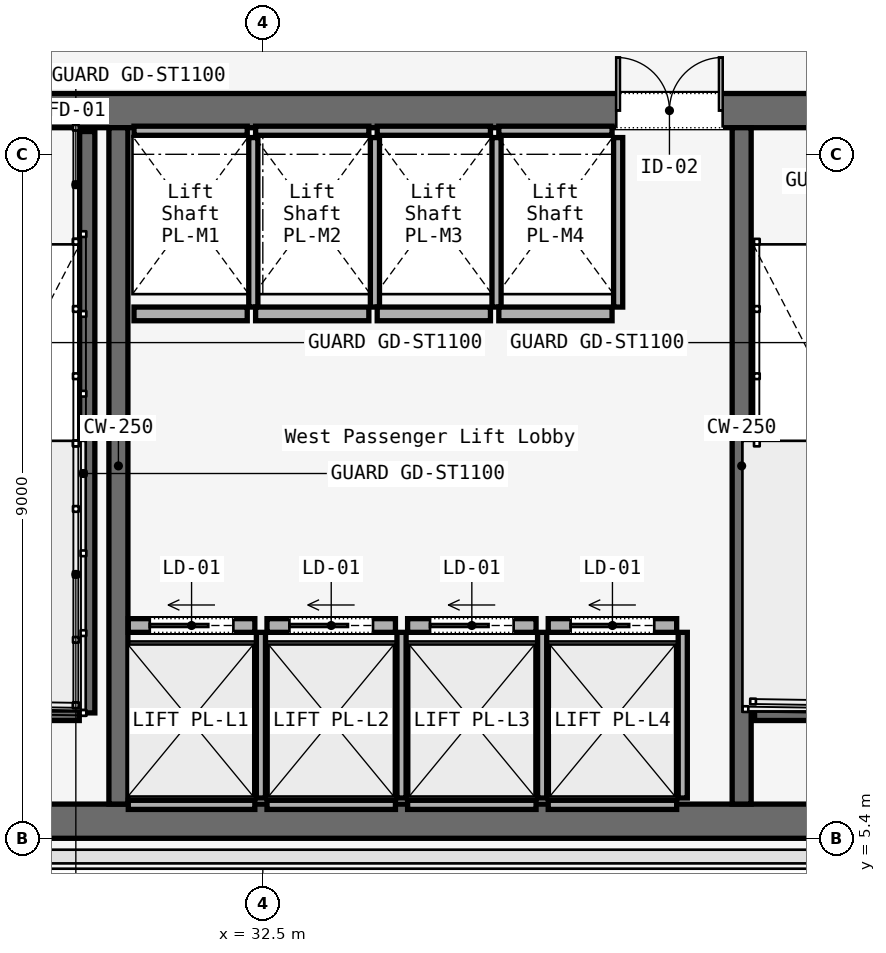
"""IFC4 building model, lengths in metres.
Left out: names, types, materials, properties, quantities, classifications, styles, units other than length and angle.
Written with IfcOpenShell. Run it as: python <this file> out.ifc"""

import sys

from ifc_helpers import new_model, si_unit, direction, frame, frame_2d, origin, place, context, subcontext, project, spatial, rectangle, extrude, element, fill, save


model = new_model("IFC4")
c1 = context("Model", 3, precision=1e-05, world=origin(), true_north=direction((0.0, 1.0)))
c2 = subcontext(c1, "Body", "Model", "MODEL_VIEW")
j1 = project(units=[si_unit("LENGTHUNIT", "METRE"), si_unit("PLANEANGLEUNIT", "RADIAN")], contexts=[c1])
p1 = place(None, origin())
s1 = spatial("IfcSite", under=j1, at=p1, CompositionType="ELEMENT")
p2 = place(p1, origin())
s2 = spatial("IfcBuilding", under=s1, at=p2, CompositionType="ELEMENT")
p3 = place(p2, frame((0.0, 0.0, 43.6)))
s3 = spatial("IfcBuildingStorey", under=s2, at=p3, CompositionType="ELEMENT", Elevation=43.6)
p4 = place(p3, frame((26.45, 14.975, 0.0), z_axis=(0.0, 0.0, 1.0), x_axis=(1.0, 0.0, 0.0)))
e1 = element("IfcWall", 1, at=p4, inside=s3, PredefinedType="SOLIDWALL", context=c2, shape_type="SweptSolid", body=[
    extrude(rectangle(XDim=31.1, YDim=0.45, at=frame_2d((15.55, 0.0))), origin(), (0.0, 0.0, 1.0), 3.58),
])
p5 = place(p4, frame((1.65, 0.0, 0.0)))
e2 = element("IfcOpeningElement", 2, at=p5, cuts=e1, PredefinedType="OPENING", context=c2, shape_type="SweptSolid", body=[
    extrude(rectangle(XDim=1.1, YDim=2.2, at=frame_2d((0.55, 1.1))), frame((0.0, 0.225, 0.0), z_axis=(0.0, -1.0, 0.0), x_axis=(1.0, 0.0, 0.0)), (0.0, 0.0, 1.0), 0.45),
])
p6 = place(p4, frame((13.65, 0.0, 0.0)))
e3 = element("IfcOpeningElement", 3, at=p6, cuts=e1, PredefinedType="OPENING", context=c2, shape_type="SweptSolid", body=[
    extrude(rectangle(XDim=1.1, YDim=2.2, at=frame_2d((0.55, 1.1))), frame((0.0, 0.225, 0.0), z_axis=(0.0, -1.0, 0.0), x_axis=(1.0, 0.0, 0.0)), (0.0, 0.0, 1.0), 0.45),
])
p7 = place(p4, frame((25.55, 0.0, 0.0)))
e4 = element("IfcOpeningElement", 4, at=p7, cuts=e1, PredefinedType="OPENING", context=c2, shape_type="SweptSolid", body=[
    extrude(rectangle(XDim=1.1, YDim=2.2, at=frame_2d((0.55, 1.1))), frame((0.0, 0.225, 0.0), z_axis=(0.0, -1.0, 0.0), x_axis=(1.0, 0.0, 0.0)), (0.0, 0.0, 1.0), 0.45),
])
p8 = place(p4, frame((10.7, 0.0, 0.0)))
e5 = element("IfcOpeningElement", 5, at=p8, cuts=e1, PredefinedType="OPENING", context=c2, shape_type="SweptSolid", body=[
    extrude(rectangle(XDim=1.4, YDim=2.2, at=frame_2d((0.7, 1.1))), frame((0.0, 0.225, 0.0), z_axis=(0.0, -1.0, 0.0), x_axis=(1.0, 0.0, 0.0)), (0.0, 0.0, 1.0), 0.45),
])
p9 = place(p4, frame((19.35, 0.0, 0.0)))
e6 = element("IfcOpeningElement", 6, at=p9, cuts=e1, PredefinedType="OPENING", context=c2, shape_type="SweptSolid", body=[
    extrude(rectangle(XDim=1.1, YDim=2.2, at=frame_2d((0.55, 1.1))), frame((0.0, 0.225, 0.0), z_axis=(0.0, -1.0, 0.0), x_axis=(1.0, 0.0, 0.0)), (0.0, 0.0, 1.0), 0.45),
])
p10 = place(p4, frame((21.4, 0.0, 0.0)))
e7 = element("IfcOpeningElement", 7, at=p10, cuts=e1, PredefinedType="OPENING", context=c2, shape_type="SweptSolid", body=[
    extrude(rectangle(XDim=0.9, YDim=2.1, at=frame_2d((0.45, 1.05))), frame((0.0, 0.225, 0.0), z_axis=(0.0, -1.0, 0.0), x_axis=(1.0, 0.0, 0.0)), (0.0, 0.0, 1.0), 0.45),
])
p11 = place(p4, frame((23.35, 0.0, 0.0)))
e8 = element("IfcOpeningElement", 8, at=p11, cuts=e1, PredefinedType="OPENING", context=c2, shape_type="SweptSolid", body=[
    extrude(rectangle(XDim=1.3, YDim=2.3, at=frame_2d((0.65, 1.15))), frame((0.0, 0.225, 0.0), z_axis=(0.0, -1.0, 0.0), x_axis=(1.0, 0.0, 0.0)), (0.0, 0.0, 1.0), 0.45),
])
p12 = place(p3, frame((26.45, 5.625, 0.0), z_axis=(0.0, 0.0, 1.0), x_axis=(1.0, 0.0, 0.0)))
e9 = element("IfcWall", 9, at=p12, inside=s3, PredefinedType="SOLIDWALL", context=c2, shape_type="SweptSolid", body=[
    extrude(rectangle(XDim=31.1, YDim=0.45, at=frame_2d((15.55, 0.0))), origin(), (0.0, 0.0, 1.0), 3.58),
])
for number, where, z_axis, x_axis in (
    (10, (30.6, 5.85, 0.0), (0.0, 0.0, 1.0), (0.0, 1.0, 0.0)),
    (11, (38.8, 5.85, 0.0), (0.0, 0.0, 1.0), (0.0, 1.0, 0.0)),
):
    element("IfcWall", number, at=place(p3, frame(where, z_axis=z_axis, x_axis=x_axis)), inside=s3, PredefinedType="SOLIDWALL", context=c2, shape_type="SweptSolid", body=[
        extrude(rectangle(XDim=8.9, YDim=0.25, at=frame_2d((4.45, 0.0))), origin(), (0.0, 0.0, 1.0), 3.58),
    ])
p13 = place(p3, frame((30.19, 14.7, 0.0), z_axis=(0.0, 0.0, 1.0), x_axis=(0.0, -1.0, 0.0)))
e12 = element("IfcWall", 12, at=p13, inside=s3, PredefinedType="SOLIDWALL", context=c2, shape_type="SweptSolid", body=[
    extrude(rectangle(XDim=7.65, YDim=0.2, at=frame_2d((3.825, 0.0))), origin(), (0.0, 0.0, 1.0), 3.8),
])
for number, where, z_axis, x_axis in (
    (13, (26.97, 7.05, 0.0), (0.0, 0.0, 1.0), (1.0, 0.0, 0.0)),
    (14, (38.97, 7.05, 0.0), (0.0, 0.0, 1.0), (1.0, 0.0, 0.0)),
):
    element("IfcWall", number, at=place(p3, frame(where, z_axis=z_axis, x_axis=x_axis)), inside=s3, PredefinedType="SOLIDWALL", context=c2, shape_type="SweptSolid", body=[
        extrude(rectangle(XDim=3.115, YDim=0.2, at=frame_2d((1.558, 0.0))), origin(), (0.0, 0.0, 1.0), 3.8),
    ])
p14 = place(p3, frame((30.73, 8.2, 0.0), z_axis=(0.0, 0.0, 1.0), x_axis=(1.0, 0.0, 0.0)))
e15 = element("IfcWall", 15, at=p14, inside=s3, PredefinedType="SOLIDWALL", context=c2, shape_type="SweptSolid", body=[
    extrude(rectangle(XDim=1.665, YDim=0.18, at=frame_2d((0.833, 0.0))), origin(), (0.0, 0.0, 1.0), 2.933),
])
p15 = place(p14, frame((0.282, 0.0, 0.0)))
e16 = element("IfcOpeningElement", 16, at=p15, cuts=e15, PredefinedType="OPENING", context=c2, shape_type="SweptSolid", body=[
    extrude(rectangle(XDim=1.1, YDim=2.2, at=frame_2d((0.55, 1.1))), frame((0.0, 0.09, 0.0), z_axis=(0.0, -1.0, 0.0), x_axis=(1.0, 0.0, 0.0)), (0.0, 0.0, 1.0), 0.18),
])
p16 = place(p3, frame((30.73, 5.84, 0.0), z_axis=(0.0, 0.0, 1.0), x_axis=(1.0, 0.0, 0.0)))
e17 = element("IfcWall", 17, at=p16, inside=s3, PredefinedType="SOLIDWALL", context=c2, shape_type="SweptSolid", body=[
    extrude(rectangle(XDim=1.665, YDim=0.12, at=frame_2d((0.833, 0.0))), origin(), (0.0, 0.0, 1.0), 2.933),
])
p17 = place(p3, frame((32.475, 5.93, 0.0), z_axis=(0.0, 0.0, 1.0), x_axis=(0.0, 1.0, 0.0)))
e18 = element("IfcWall", 18, at=p17, inside=s3, PredefinedType="SOLIDWALL", context=c2, shape_type="SweptSolid", body=[
    extrude(rectangle(XDim=2.18, YDim=0.12, at=frame_2d((1.09, 0.0))), origin(), (0.0, 0.0, 1.0), 2.933),
])
p18 = place(p3, frame((32.555, 8.2, 0.0), z_axis=(0.0, 0.0, 1.0), x_axis=(1.0, 0.0, 0.0)))
e19 = element("IfcWall", 19, at=p18, inside=s3, PredefinedType="SOLIDWALL", context=c2, shape_type="SweptSolid", body=[
    extrude(rectangle(XDim=1.69, YDim=0.18, at=frame_2d((0.845, 0.0))), origin(), (0.0, 0.0, 1.0), 2.933),
])
p19 = place(p18, frame((0.295, 0.0, 0.0)))
e20 = element("IfcOpeningElement", 20, at=p19, cuts=e19, PredefinedType="OPENING", context=c2, shape_type="SweptSolid", body=[
    extrude(rectangle(XDim=1.1, YDim=2.2, at=frame_2d((0.55, 1.1))), frame((0.0, 0.09, 0.0), z_axis=(0.0, -1.0, 0.0), x_axis=(1.0, 0.0, 0.0)), (0.0, 0.0, 1.0), 0.18),
])
p20 = place(p3, frame((32.555, 5.84, 0.0), z_axis=(0.0, 0.0, 1.0), x_axis=(1.0, 0.0, 0.0)))
e21 = element("IfcWall", 21, at=p20, inside=s3, PredefinedType="SOLIDWALL", context=c2, shape_type="SweptSolid", body=[
    extrude(rectangle(XDim=1.69, YDim=0.12, at=frame_2d((0.845, 0.0))), origin(), (0.0, 0.0, 1.0), 2.933),
])
p21 = place(p3, frame((34.325, 5.93, 0.0), z_axis=(0.0, 0.0, 1.0), x_axis=(0.0, 1.0, 0.0)))
e22 = element("IfcWall", 22, at=p21, inside=s3, PredefinedType="SOLIDWALL", context=c2, shape_type="SweptSolid", body=[
    extrude(rectangle(XDim=2.18, YDim=0.12, at=frame_2d((1.09, 0.0))), origin(), (0.0, 0.0, 1.0), 2.933),
])
p22 = place(p3, frame((34.405, 8.2, 0.0), z_axis=(0.0, 0.0, 1.0), x_axis=(1.0, 0.0, 0.0)))
e23 = element("IfcWall", 23, at=p22, inside=s3, PredefinedType="SOLIDWALL", context=c2, shape_type="SweptSolid", body=[
    extrude(rectangle(XDim=1.69, YDim=0.18, at=frame_2d((0.845, 0.0))), origin(), (0.0, 0.0, 1.0), 2.933),
])
p23 = place(p22, frame((0.295, 0.0, 0.0)))
e24 = element("IfcOpeningElement", 24, at=p23, cuts=e23, PredefinedType="OPENING", context=c2, shape_type="SweptSolid", body=[
    extrude(rectangle(XDim=1.1, YDim=2.2, at=frame_2d((0.55, 1.1))), frame((0.0, 0.09, 0.0), z_axis=(0.0, -1.0, 0.0), x_axis=(1.0, 0.0, 0.0)), (0.0, 0.0, 1.0), 0.18),
])
p24 = place(p3, frame((34.405, 5.84, 0.0), z_axis=(0.0, 0.0, 1.0), x_axis=(1.0, 0.0, 0.0)))
e25 = element("IfcWall", 25, at=p24, inside=s3, PredefinedType="SOLIDWALL", context=c2, shape_type="SweptSolid", body=[
    extrude(rectangle(XDim=1.69, YDim=0.12, at=frame_2d((0.845, 0.0))), origin(), (0.0, 0.0, 1.0), 2.933),
])
p25 = place(p3, frame((36.175, 5.93, 0.0), z_axis=(0.0, 0.0, 1.0), x_axis=(0.0, 1.0, 0.0)))
e26 = element("IfcWall", 26, at=p25, inside=s3, PredefinedType="SOLIDWALL", context=c2, shape_type="SweptSolid", body=[
    extrude(rectangle(XDim=2.18, YDim=0.12, at=frame_2d((1.09, 0.0))), origin(), (0.0, 0.0, 1.0), 2.933),
])
p26 = place(p3, frame((36.255, 8.2, 0.0), z_axis=(0.0, 0.0, 1.0), x_axis=(1.0, 0.0, 0.0)))
e27 = element("IfcWall", 27, at=p26, inside=s3, PredefinedType="SOLIDWALL", context=c2, shape_type="SweptSolid", body=[
    extrude(rectangle(XDim=1.69, YDim=0.18, at=frame_2d((0.845, 0.0))), origin(), (0.0, 0.0, 1.0), 2.933),
])
p27 = place(p26, frame((0.295, 0.0, 0.0)))
e28 = element("IfcOpeningElement", 28, at=p27, cuts=e27, PredefinedType="OPENING", context=c2, shape_type="SweptSolid", body=[
    extrude(rectangle(XDim=1.1, YDim=2.2, at=frame_2d((0.55, 1.1))), frame((0.0, 0.09, 0.0), z_axis=(0.0, -1.0, 0.0), x_axis=(1.0, 0.0, 0.0)), (0.0, 0.0, 1.0), 0.18),
])
p28 = place(p3, frame((36.255, 5.84, 0.0), z_axis=(0.0, 0.0, 1.0), x_axis=(1.0, 0.0, 0.0)))
e29 = element("IfcWall", 29, at=p28, inside=s3, PredefinedType="SOLIDWALL", context=c2, shape_type="SweptSolid", body=[
    extrude(rectangle(XDim=1.69, YDim=0.12, at=frame_2d((0.845, 0.0))), origin(), (0.0, 0.0, 1.0), 2.933),
])
p29 = place(p3, frame((38.025, 5.93, 0.0), z_axis=(0.0, 0.0, 1.0), x_axis=(0.0, 1.0, 0.0)))
e30 = element("IfcWall", 30, at=p29, inside=s3, PredefinedType="SOLIDWALL", context=c2, shape_type="SweptSolid", body=[
    extrude(rectangle(XDim=2.18, YDim=0.12, at=frame_2d((1.09, 0.0))), origin(), (0.0, 0.0, 1.0), 2.933),
])
p30 = place(p3, frame((30.805, 12.3, 0.0), z_axis=(0.0, 0.0, 1.0), x_axis=(1.0, 0.0, 0.0)))
e31 = element("IfcWall", 31, at=p30, inside=s3, PredefinedType="SOLIDWALL", context=c2, shape_type="SweptSolid", body=[
    extrude(rectangle(XDim=1.49, YDim=0.18, at=frame_2d((0.745, 0.0))), origin(), (0.0, 0.0, 1.0), 2.933),
])
p31 = place(p3, frame((30.805, 14.71, 0.0), z_axis=(0.0, 0.0, 1.0), x_axis=(1.0, 0.0, 0.0)))
e32 = element("IfcWall", 32, at=p31, inside=s3, PredefinedType="SOLIDWALL", context=c2, shape_type="SweptSolid", body=[
    extrude(rectangle(XDim=1.49, YDim=0.12, at=frame_2d((0.745, 0.0))), origin(), (0.0, 0.0, 1.0), 2.933),
])
p32 = place(p3, frame((32.375, 12.39, 0.0), z_axis=(0.0, 0.0, 1.0), x_axis=(0.0, 1.0, 0.0)))
e33 = element("IfcWall", 33, at=p32, inside=s3, PredefinedType="SOLIDWALL", context=c2, shape_type="SweptSolid", body=[
    extrude(rectangle(XDim=2.23, YDim=0.12, at=frame_2d((1.115, 0.0))), origin(), (0.0, 0.0, 1.0), 2.933),
])
p33 = place(p3, frame((32.405, 12.3, 0.0), z_axis=(0.0, 0.0, 1.0), x_axis=(1.0, 0.0, 0.0)))
e34 = element("IfcWall", 34, at=p33, inside=s3, PredefinedType="SOLIDWALL", context=c2, shape_type="SweptSolid", body=[
    extrude(rectangle(XDim=1.49, YDim=0.18, at=frame_2d((0.745, 0.0))), origin(), (0.0, 0.0, 1.0), 2.933),
])
p34 = place(p3, frame((32.405, 14.71, 0.0), z_axis=(0.0, 0.0, 1.0), x_axis=(1.0, 0.0, 0.0)))
e35 = element("IfcWall", 35, at=p34, inside=s3, PredefinedType="SOLIDWALL", context=c2, shape_type="SweptSolid", body=[
    extrude(rectangle(XDim=1.49, YDim=0.12, at=frame_2d((0.745, 0.0))), origin(), (0.0, 0.0, 1.0), 2.933),
])
p35 = place(p3, frame((33.975, 12.39, 0.0), z_axis=(0.0, 0.0, 1.0), x_axis=(0.0, 1.0, 0.0)))
e36 = element("IfcWall", 36, at=p35, inside=s3, PredefinedType="SOLIDWALL", context=c2, shape_type="SweptSolid", body=[
    extrude(rectangle(XDim=2.23, YDim=0.12, at=frame_2d((1.115, 0.0))), origin(), (0.0, 0.0, 1.0), 2.933),
])
p36 = place(p3, frame((34.005, 12.3, 0.0), z_axis=(0.0, 0.0, 1.0), x_axis=(1.0, 0.0, 0.0)))
e37 = element("IfcWall", 37, at=p36, inside=s3, PredefinedType="SOLIDWALL", context=c2, shape_type="SweptSolid", body=[
    extrude(rectangle(XDim=1.49, YDim=0.18, at=frame_2d((0.745, 0.0))), origin(), (0.0, 0.0, 1.0), 2.933),
])
p37 = place(p3, frame((34.005, 14.71, 0.0), z_axis=(0.0, 0.0, 1.0), x_axis=(1.0, 0.0, 0.0)))
e38 = element("IfcWall", 38, at=p37, inside=s3, PredefinedType="SOLIDWALL", context=c2, shape_type="SweptSolid", body=[
    extrude(rectangle(XDim=1.49, YDim=0.12, at=frame_2d((0.745, 0.0))), origin(), (0.0, 0.0, 1.0), 2.933),
])
p38 = place(p3, frame((35.575, 12.39, 0.0), z_axis=(0.0, 0.0, 1.0), x_axis=(0.0, 1.0, 0.0)))
e39 = element("IfcWall", 39, at=p38, inside=s3, PredefinedType="SOLIDWALL", context=c2, shape_type="SweptSolid", body=[
    extrude(rectangle(XDim=2.23, YDim=0.12, at=frame_2d((1.115, 0.0))), origin(), (0.0, 0.0, 1.0), 2.933),
])
p39 = place(p3, frame((35.605, 12.3, 0.0), z_axis=(0.0, 0.0, 1.0), x_axis=(1.0, 0.0, 0.0)))
e40 = element("IfcWall", 40, at=p39, inside=s3, PredefinedType="SOLIDWALL", context=c2, shape_type="SweptSolid", body=[
    extrude(rectangle(XDim=1.49, YDim=0.18, at=frame_2d((0.745, 0.0))), origin(), (0.0, 0.0, 1.0), 2.933),
])
p40 = place(p3, frame((35.605, 14.71, 0.0), z_axis=(0.0, 0.0, 1.0), x_axis=(1.0, 0.0, 0.0)))
e41 = element("IfcWall", 41, at=p40, inside=s3, PredefinedType="SOLIDWALL", context=c2, shape_type="SweptSolid", body=[
    extrude(rectangle(XDim=1.49, YDim=0.12, at=frame_2d((0.745, 0.0))), origin(), (0.0, 0.0, 1.0), 2.933),
])
p41 = place(p3, frame((37.175, 12.39, 0.0), z_axis=(0.0, 0.0, 1.0), x_axis=(0.0, 1.0, 0.0)))
e42 = element("IfcWall", 42, at=p41, inside=s3, PredefinedType="SOLIDWALL", context=c2, shape_type="SweptSolid", body=[
    extrude(rectangle(XDim=2.23, YDim=0.12, at=frame_2d((1.115, 0.0))), origin(), (0.0, 0.0, 1.0), 2.933),
])
p42 = place(p8, origin())
e43 = element("IfcDoor", 43, at=p42, inside=s3, OperationType="DOUBLE_DOOR_SINGLE_SWING", PredefinedType="DOOR", context=c2, shape_type="SweptSolid", body=[
    extrude(rectangle(XDim=1.4, YDim=2.2, at=frame_2d((0.7, 1.1))), frame((0.0, 0.025, 0.0), z_axis=(0.0, -1.0, 0.0), x_axis=(1.0, 0.0, 0.0)), (0.0, 0.0, 1.0), 0.05),
])
fill(e5, e43)
p43 = place(p15, origin())
e44 = element("IfcDoor", 44, at=p43, inside=s3, OperationType="SLIDING_TO_LEFT", PredefinedType="DOOR", context=c2, shape_type="SweptSolid", body=[
    extrude(rectangle(XDim=1.1, YDim=2.2, at=frame_2d((0.55, 1.1))), frame((0.0, 0.025, 0.0), z_axis=(0.0, -1.0, 0.0), x_axis=(1.0, 0.0, 0.0)), (0.0, 0.0, 1.0), 0.05),
])
fill(e16, e44)
p44 = place(p19, origin())
e45 = element("IfcDoor", 45, at=p44, inside=s3, OperationType="SLIDING_TO_LEFT", PredefinedType="DOOR", context=c2, shape_type="SweptSolid", body=[
    extrude(rectangle(XDim=1.1, YDim=2.2, at=frame_2d((0.55, 1.1))), frame((0.0, 0.025, 0.0), z_axis=(0.0, -1.0, 0.0), x_axis=(1.0, 0.0, 0.0)), (0.0, 0.0, 1.0), 0.05),
])
fill(e20, e45)
p45 = place(p23, origin())
e46 = element("IfcDoor", 46, at=p45, inside=s3, OperationType="SLIDING_TO_LEFT", PredefinedType="DOOR", context=c2, shape_type="SweptSolid", body=[
    extrude(rectangle(XDim=1.1, YDim=2.2, at=frame_2d((0.55, 1.1))), frame((0.0, 0.025, 0.0), z_axis=(0.0, -1.0, 0.0), x_axis=(1.0, 0.0, 0.0)), (0.0, 0.0, 1.0), 0.05),
])
fill(e24, e46)
p46 = place(p27, origin())
e47 = element("IfcDoor", 47, at=p46, inside=s3, OperationType="SLIDING_TO_LEFT", PredefinedType="DOOR", context=c2, shape_type="SweptSolid", body=[
    extrude(rectangle(XDim=1.1, YDim=2.2, at=frame_2d((0.55, 1.1))), frame((0.0, 0.025, 0.0), z_axis=(0.0, -1.0, 0.0), x_axis=(1.0, 0.0, 0.0)), (0.0, 0.0, 1.0), 0.05),
])
fill(e28, e47)
save(model, sys.argv[1])
